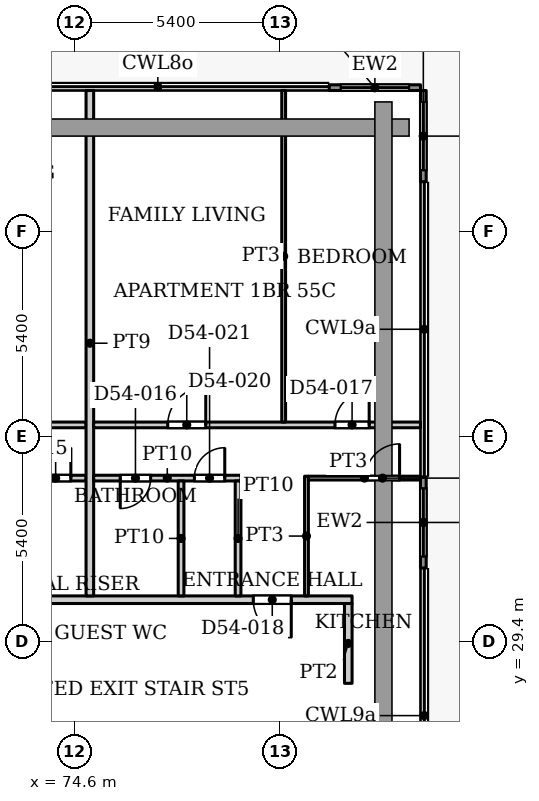
"""IFC4 building model, lengths in metres.
Left out: names, types, materials, properties, quantities, classifications, styles, units other than length and angle.
Written with IfcOpenShell. Run it as: python <this file> out.ifc"""

import sys

from ifc_helpers import new_model, si_unit, direction, frame, frame_2d, origin, place, context, subcontext, project, spatial, rectangle, extrude, source, transform, mapped, element, fill, save


model = new_model("IFC4")
c1 = context("Model", 3, precision=1e-05, world=origin(), true_north=direction((0.0, 1.0)))
c2 = subcontext(c1, "Body", "Model", "MODEL_VIEW")
j1 = project(units=[si_unit("LENGTHUNIT", "METRE"), si_unit("PLANEANGLEUNIT", "RADIAN")], contexts=[c1])
p1 = place(None, origin())
s1 = spatial("IfcSite", under=j1, at=p1, CompositionType="ELEMENT")
p2 = place(p1, origin())
s2 = spatial("IfcBuilding", under=s1, at=p2, CompositionType="ELEMENT")
p3 = place(p2, frame((0.0, 0.0, 235.7)))
s3 = spatial("IfcBuildingStorey", under=s2, at=p3, CompositionType="ELEMENT", Elevation=235.7)
p4 = place(p3, frame((81.3, 43.975, 0.0), z_axis=(0.0, 0.0, 1.0), x_axis=(1.0, 0.0, 0.0)))
e1 = element("IfcWall", 1, at=p4, inside=s3, PredefinedType="SOLIDWALL", context=c2, shape_type="SweptSolid", body=[
    extrude(rectangle(XDim=2.4, YDim=0.15, at=frame_2d((1.2, 0.0))), origin(), (0.0, 0.0, 1.0), 3.75),
])
p5 = place(p4, frame((0.3, 0.0, 0.0)))
e2 = element("IfcOpeningElement", 2, at=p5, cuts=e1, PredefinedType="OPENING", context=c2, shape_type="SweptSolid", body=[
    extrude(rectangle(XDim=1.8, YDim=2.4, at=frame_2d((0.9, 1.2))), frame((0.0, 0.085, 0.0), z_axis=(0.0, -1.0, 0.0), x_axis=(1.0, 0.0, 0.0)), (0.0, 0.0, 1.0), 0.17),
])
p6 = place(p3, frame((83.775, 43.9, 0.0), z_axis=(0.0, 0.0, 1.0), x_axis=(0.0, -1.0, 0.0)))
e3 = element("IfcWall", 3, at=p6, inside=s3, PredefinedType="SOLIDWALL", context=c2, shape_type="SweptSolid", body=[
    extrude(rectangle(XDim=2.4, YDim=0.15, at=frame_2d((1.2, 0.0))), origin(), (0.0, 0.0, 1.0), 3.75),
])
p7 = place(p6, frame((0.3, 0.0, 0.0)))
e4 = element("IfcOpeningElement", 4, at=p7, cuts=e3, PredefinedType="OPENING", context=c2, shape_type="SweptSolid", body=[
    extrude(rectangle(XDim=1.8, YDim=2.4, at=frame_2d((0.9, 1.2))), frame((0.0, 0.085, 0.0), z_axis=(0.0, -1.0, 0.0), x_axis=(1.0, 0.0, 0.0)), (0.0, 0.0, 1.0), 0.17),
])
p8 = place(p3, frame((83.775, 33.733, 0.0), z_axis=(0.0, 0.0, 1.0), x_axis=(0.0, -1.0, 0.0)))
e5 = element("IfcWall", 5, at=p8, inside=s3, PredefinedType="SOLIDWALL", context=c2, shape_type="SweptSolid", body=[
    extrude(rectangle(XDim=2.399, YDim=0.15, at=frame_2d((1.199, 0.0))), origin(), (0.0, 0.0, 1.0), 3.75),
])
p9 = place(p8, frame((0.3, 0.0, 0.0)))
e6 = element("IfcOpeningElement", 6, at=p9, cuts=e5, PredefinedType="OPENING", context=c2, shape_type="SweptSolid", body=[
    extrude(rectangle(XDim=1.8, YDim=2.4, at=frame_2d((0.9, 1.2))), frame((0.0, 0.085, 0.0), z_axis=(0.0, -1.0, 0.0), x_axis=(1.0, 0.0, 0.0)), (0.0, 0.0, 1.0), 0.17),
])
p10 = place(p3, frame((53.499, 30.5, 0.0), z_axis=(0.0, 0.0, 1.0), x_axis=(1.0, 0.0, 0.0)))
e7 = element("IfcWall", 7, at=p10, inside=s3, PredefinedType="PARTITIONING", context=c2, shape_type="SweptSolid", body=[
    extrude(rectangle(XDim=28.401, YDim=0.2, at=frame_2d((14.2, 0.0))), origin(), (0.0, 0.0, 1.0), 3.6),
])
p11 = place(p10, frame((0.301, 0.0, 0.0)))
e8 = element("IfcOpeningElement", 8, at=p11, cuts=e7, PredefinedType="OPENING", context=c2, shape_type="SweptSolid", body=[
    extrude(rectangle(XDim=1.0, YDim=2.1, at=frame_2d((0.5, 1.05))), frame((0.0, 0.11, 0.0), z_axis=(0.0, -1.0, 0.0), x_axis=(1.0, 0.0, 0.0)), (0.0, 0.0, 1.0), 0.22),
])
p12 = place(p10, frame((18.151, 0.0, 0.0)))
e9 = element("IfcOpeningElement", 9, at=p12, cuts=e7, PredefinedType="OPENING", context=c2, shape_type="SweptSolid", body=[
    extrude(rectangle(XDim=1.0, YDim=2.1, at=frame_2d((0.5, 1.05))), frame((0.0, 0.11, 0.0), z_axis=(0.0, -1.0, 0.0), x_axis=(1.0, 0.0, 0.0)), (0.0, 0.0, 1.0), 0.22),
])
p13 = place(p10, frame((25.801, 0.0, 0.0)))
e10 = element("IfcOpeningElement", 10, at=p13, cuts=e7, PredefinedType="OPENING", context=c2, shape_type="SweptSolid", body=[
    extrude(rectangle(XDim=1.0, YDim=2.1, at=frame_2d((0.5, 1.05))), frame((0.0, 0.11, 0.0), z_axis=(0.0, -1.0, 0.0), x_axis=(1.0, 0.0, 0.0)), (0.0, 0.0, 1.0), 0.22),
])
p14 = place(p3, frame((65.2, 35.1, 0.0), z_axis=(0.0, 0.0, 1.0), x_axis=(1.0, 0.0, 0.0)))
e11 = element("IfcWall", 11, at=p14, inside=s3, PredefinedType="PARTITIONING", context=c2, shape_type="SweptSolid", body=[
    extrude(rectangle(XDim=9.7, YDim=0.15, at=frame_2d((4.85, 0.0))), origin(), (0.0, 0.0, 1.0), 3.6),
])
p15 = place(p14, frame((1.4, 0.0, 0.0)))
e12 = element("IfcOpeningElement", 12, at=p15, cuts=e11, PredefinedType="OPENING", context=c2, shape_type="SweptSolid", body=[
    extrude(rectangle(XDim=0.9, YDim=2.1, at=frame_2d((0.45, 1.05))), frame((0.0, 0.085, 0.0), z_axis=(0.0, -1.0, 0.0), x_axis=(1.0, 0.0, 0.0)), (0.0, 0.0, 1.0), 0.17),
])
p16 = place(p14, frame((6.3, 0.0, 0.0)))
e13 = element("IfcOpeningElement", 13, at=p16, cuts=e11, PredefinedType="OPENING", context=c2, shape_type="SweptSolid", body=[
    extrude(rectangle(XDim=1.0, YDim=2.1, at=frame_2d((0.5, 1.05))), frame((0.0, 0.085, 0.0), z_axis=(0.0, -1.0, 0.0), x_axis=(1.0, 0.0, 0.0)), (0.0, 0.0, 1.0), 0.17),
])
p17 = place(p3, frame((73.275, 33.7, 0.0), z_axis=(0.0, 0.0, 1.0), x_axis=(1.0, 0.0, 0.0)))
e14 = element("IfcWall", 14, at=p17, inside=s3, PredefinedType="PARTITIONING", context=c2, shape_type="SweptSolid", body=[
    extrude(rectangle(XDim=1.625, YDim=0.15, at=frame_2d((0.812, 0.0))), origin(), (0.0, 0.0, 1.0), 3.6),
])
p18 = place(p17, frame((0.425, 0.0, 0.0)))
e15 = element("IfcOpeningElement", 15, at=p18, cuts=e14, PredefinedType="OPENING", context=c2, shape_type="SweptSolid", body=[
    extrude(rectangle(XDim=0.8, YDim=2.1, at=frame_2d((0.4, 1.05))), frame((0.0, 0.085, 0.0), z_axis=(0.0, -1.0, 0.0), x_axis=(1.0, 0.0, 0.0)), (0.0, 0.0, 1.0), 0.17),
])
p19 = place(p3, frame((75.0, 30.6, 0.0), z_axis=(0.0, 0.0, 1.0), x_axis=(0.0, 1.0, 0.0)))
e16 = element("IfcWall", 16, at=p19, inside=s3, PredefinedType="PARTITIONING", context=c2, shape_type="SweptSolid", body=[
    extrude(rectangle(XDim=13.3, YDim=0.2, at=frame_2d((6.65, 0.0))), origin(), (0.0, 0.0, 1.0), 3.6),
])
p20 = place(p3, frame((75.1, 33.7, 0.0), z_axis=(0.0, 0.0, 1.0), x_axis=(1.0, 0.0, 0.0)))
e17 = element("IfcWall", 17, at=p20, inside=s3, PredefinedType="PARTITIONING", context=c2, shape_type="SweptSolid", body=[
    extrude(rectangle(XDim=3.875, YDim=0.15, at=frame_2d((1.938, 0.0))), origin(), (0.0, 0.0, 1.0), 3.6),
])
p21 = place(p20, frame((0.7, 0.0, 0.0)))
e18 = element("IfcOpeningElement", 18, at=p21, cuts=e17, PredefinedType="OPENING", context=c2, shape_type="SweptSolid", body=[
    extrude(rectangle(XDim=0.8, YDim=2.1, at=frame_2d((0.4, 1.05))), frame((0.0, 0.085, 0.0), z_axis=(0.0, -1.0, 0.0), x_axis=(1.0, 0.0, 0.0)), (0.0, 0.0, 1.0), 0.17),
])
p22 = place(p20, frame((2.65, 0.0, 0.0)))
e19 = element("IfcOpeningElement", 19, at=p22, cuts=e17, PredefinedType="OPENING", context=c2, shape_type="SweptSolid", body=[
    extrude(rectangle(XDim=0.8, YDim=2.1, at=frame_2d((0.4, 1.05))), frame((0.0, 0.085, 0.0), z_axis=(0.0, -1.0, 0.0), x_axis=(1.0, 0.0, 0.0)), (0.0, 0.0, 1.0), 0.17),
])
p23 = place(p3, frame((75.1, 35.1, 0.0), z_axis=(0.0, 0.0, 1.0), x_axis=(1.0, 0.0, 0.0)))
e20 = element("IfcWall", 20, at=p23, inside=s3, PredefinedType="PARTITIONING", context=c2, shape_type="SweptSolid", body=[
    extrude(rectangle(XDim=8.6, YDim=0.15, at=frame_2d((4.3, 0.0))), origin(), (0.0, 0.0, 1.0), 3.6),
])
p24 = place(p23, frame((6.35, 0.0, 0.0)))
e21 = element("IfcOpeningElement", 21, at=p24, cuts=e20, PredefinedType="OPENING", context=c2, shape_type="SweptSolid", body=[
    extrude(rectangle(XDim=0.9, YDim=2.1, at=frame_2d((0.45, 1.05))), frame((0.0, 0.085, 0.0), z_axis=(0.0, -1.0, 0.0), x_axis=(1.0, 0.0, 0.0)), (0.0, 0.0, 1.0), 0.17),
])
p25 = place(p23, frame((1.95, 0.0, 0.0)))
e22 = element("IfcOpeningElement", 22, at=p25, cuts=e20, PredefinedType="OPENING", context=c2, shape_type="SweptSolid", body=[
    extrude(rectangle(XDim=1.0, YDim=2.1, at=frame_2d((0.5, 1.05))), frame((0.0, 0.085, 0.0), z_axis=(0.0, -1.0, 0.0), x_axis=(1.0, 0.0, 0.0)), (0.0, 0.0, 1.0), 0.17),
])
for number, where, z_axis, x_axis in (
    (23, (77.4, 30.6, 0.0), (0.0, 0.0, 1.0), (0.0, 1.0, 0.0)),
    (24, (78.9, 30.6, 0.0), (0.0, 0.0, 1.0), (0.0, 1.0, 0.0)),
):
    element("IfcWall", number, at=place(p3, frame(where, z_axis=z_axis, x_axis=x_axis)), inside=s3, PredefinedType="PARTITIONING", context=c2, shape_type="SweptSolid", body=[
        extrude(rectangle(XDim=3.025, YDim=0.15, at=frame_2d((1.512, 0.0))), origin(), (0.0, 0.0, 1.0), 3.6),
    ])
p26 = place(p3, frame((80.1, 35.175, 0.0), z_axis=(0.0, 0.0, 1.0), x_axis=(0.0, 1.0, 0.0)))
e25 = element("IfcWall", 25, at=p26, inside=s3, PredefinedType="PARTITIONING", context=c2, shape_type="SweptSolid", body=[
    extrude(rectangle(XDim=8.725, YDim=0.1, at=frame_2d((4.362, 0.0))), origin(), (0.0, 0.0, 1.0), 3.6),
])
p27 = place(p3, frame((80.7, 30.6, 0.0), z_axis=(0.0, 0.0, 1.0), x_axis=(0.0, 1.0, 0.0)))
e26 = element("IfcWall", 26, at=p27, inside=s3, PredefinedType="PARTITIONING", context=c2, shape_type="SweptSolid", body=[
    extrude(rectangle(XDim=3.15, YDim=0.1, at=frame_2d((1.575, 0.0))), origin(), (0.0, 0.0, 1.0), 3.6),
])
p28 = place(p3, frame((80.75, 33.7, 0.0), z_axis=(0.0, 0.0, 1.0), x_axis=(1.0, 0.0, 0.0)))
e27 = element("IfcWall", 27, at=p28, inside=s3, PredefinedType="PARTITIONING", context=c2, shape_type="SweptSolid", body=[
    extrude(rectangle(XDim=2.95, YDim=0.1, at=frame_2d((1.475, 0.0))), origin(), (0.0, 0.0, 1.0), 3.6),
])
p29 = place(p28, frame((1.5, 0.0, 0.0)))
e28 = element("IfcOpeningElement", 28, at=p29, cuts=e27, PredefinedType="OPENING", context=c2, shape_type="SweptSolid", body=[
    extrude(rectangle(XDim=0.9, YDim=2.1, at=frame_2d((0.45, 1.05))), frame((0.0, 0.06, 0.0), z_axis=(0.0, -1.0, 0.0), x_axis=(1.0, 0.0, 0.0)), (0.0, 0.0, 1.0), 0.12),
])
p30 = place(p3, frame((81.8, 28.3, 0.0), z_axis=(0.0, 0.0, 1.0), x_axis=(0.0, 1.0, 0.0)))
e29 = element("IfcWall", 29, at=p30, inside=s3, PredefinedType="PARTITIONING", context=c2, shape_type="SweptSolid", body=[
    extrude(rectangle(XDim=2.1, YDim=0.2, at=frame_2d((1.05, 0.0))), origin(), (0.0, 0.0, 1.0), 3.6),
])
m1 = source(origin(), c2, "Body", "SweptSolid", [
    extrude(rectangle(XDim=1.8, YDim=2.4, at=frame_2d((0.9, 1.2))), frame((0.0, 0.025, 0.0), z_axis=(0.0, -1.0, 0.0), x_axis=(1.0, 0.0, 0.0)), (0.0, 0.0, 1.0), 0.05),
])
p31 = place(p5, origin())
e30 = element("IfcDoor", 30, at=p31, inside=s3, OperationType="SLIDING_TO_LEFT", PredefinedType="DOOR", context=c2, shape_type="MappedRepresentation", body=[
    mapped(m1, transform((0.0, 0.0, 0.0), x_axis=(1.0, 0.0, 0.0), y_axis=(0.0, 1.0, 0.0), z_axis=(0.0, 0.0, 1.0), scale=1.0)),
])
fill(e2, e30)
p32 = place(p7, origin())
e31 = element("IfcDoor", 31, at=p32, inside=s3, OperationType="SLIDING_TO_LEFT", PredefinedType="DOOR", context=c2, shape_type="MappedRepresentation", body=[
    mapped(m1, transform((0.0, 0.0, 0.0), x_axis=(1.0, 0.0, 0.0), y_axis=(0.0, 1.0, 0.0), z_axis=(0.0, 0.0, 1.0), scale=1.0)),
])
fill(e4, e31)
p33 = place(p9, origin())
e32 = element("IfcDoor", 32, at=p33, inside=s3, OperationType="SLIDING_TO_LEFT", PredefinedType="DOOR", context=c2, shape_type="MappedRepresentation", body=[
    mapped(m1, transform((0.0, 0.0, 0.0), x_axis=(1.0, 0.0, 0.0), y_axis=(0.0, 1.0, 0.0), z_axis=(0.0, 0.0, 1.0), scale=1.0)),
])
fill(e6, e32)
m2 = source(origin(), c2, "Body", "SweptSolid", [
    extrude(rectangle(XDim=0.8, YDim=2.1, at=frame_2d((0.4, 1.05))), frame((0.0, 0.025, 0.0), z_axis=(0.0, -1.0, 0.0), x_axis=(1.0, 0.0, 0.0)), (0.0, 0.0, 1.0), 0.05),
])
p34 = place(p18, origin())
e33 = element("IfcDoor", 33, at=p34, inside=s3, OperationType="SINGLE_SWING_LEFT", PredefinedType="DOOR", context=c2, shape_type="MappedRepresentation", body=[
    mapped(m2, transform((0.0, 0.0, 0.0), x_axis=(1.0, 0.0, 0.0), y_axis=(0.0, 1.0, 0.0), z_axis=(0.0, 0.0, 1.0), scale=1.0)),
])
fill(e15, e33)
p35 = place(p21, origin())
e34 = element("IfcDoor", 34, at=p35, inside=s3, OperationType="SINGLE_SWING_RIGHT", PredefinedType="DOOR", context=c2, shape_type="MappedRepresentation", body=[
    mapped(m2, transform((0.0, 0.0, 0.0), x_axis=(1.0, 0.0, 0.0), y_axis=(0.0, 1.0, 0.0), z_axis=(0.0, 0.0, 1.0), scale=1.0)),
])
fill(e18, e34)
m3 = source(origin(), c2, "Body", "SweptSolid", [
    extrude(rectangle(XDim=0.9, YDim=2.1, at=frame_2d((0.45, 1.05))), frame((0.0, 0.025, 0.0), z_axis=(0.0, -1.0, 0.0), x_axis=(1.0, 0.0, 0.0)), (0.0, 0.0, 1.0), 0.05),
])
p36 = place(p24, origin())
e35 = element("IfcDoor", 35, at=p36, inside=s3, OperationType="SINGLE_SWING_LEFT", PredefinedType="DOOR", context=c2, shape_type="MappedRepresentation", body=[
    mapped(m3, transform((0.0, 0.0, 0.0), x_axis=(1.0, 0.0, 0.0), y_axis=(0.0, 1.0, 0.0), z_axis=(0.0, 0.0, 1.0), scale=1.0)),
])
fill(e21, e35)
m4 = source(origin(), c2, "Body", "SweptSolid", [
    extrude(rectangle(XDim=1.0, YDim=2.1, at=frame_2d((0.5, 1.05))), frame((0.0, 0.025, 0.0), z_axis=(0.0, -1.0, 0.0), x_axis=(1.0, 0.0, 0.0)), (0.0, 0.0, 1.0), 0.05),
])
p37 = place(p13, origin())
e36 = element("IfcDoor", 36, at=p37, inside=s3, OperationType="SINGLE_SWING_RIGHT", PredefinedType="DOOR", context=c2, shape_type="MappedRepresentation", body=[
    mapped(m4, transform((0.0, 0.0, 0.0), x_axis=(1.0, 0.0, 0.0), y_axis=(0.0, 1.0, 0.0), z_axis=(0.0, 0.0, 1.0), scale=1.0)),
])
fill(e10, e36)
p38 = place(p29, origin())
e37 = element("IfcDoor", 37, at=p38, inside=s3, OperationType="SINGLE_SWING_LEFT", PredefinedType="DOOR", context=c2, shape_type="MappedRepresentation", body=[
    mapped(m3, transform((0.0, 0.0, 0.0), x_axis=(1.0, 0.0, 0.0), y_axis=(0.0, 1.0, 0.0), z_axis=(0.0, 0.0, 1.0), scale=1.0)),
])
fill(e28, e37)
m5 = source(origin(), c2, "Body", "SweptSolid", [
    extrude(rectangle(XDim=1.0, YDim=2.1, at=frame_2d((0.5, 1.05))), frame((0.0, 0.025, 0.0), z_axis=(0.0, -1.0, 0.0), x_axis=(1.0, 0.0, 0.0)), (0.0, 0.0, 1.0), 0.05),
])
p39 = place(p25, origin())
e38 = element("IfcDoor", 38, at=p39, inside=s3, OperationType="SINGLE_SWING_LEFT", PredefinedType="DOOR", context=c2, shape_type="MappedRepresentation", body=[
    mapped(m5, transform((0.0, 0.0, 0.0), x_axis=(1.0, 0.0, 0.0), y_axis=(0.0, 1.0, 0.0), z_axis=(0.0, 0.0, 1.0), scale=1.0)),
])
fill(e22, e38)
p40 = place(p22, origin())
e39 = element("IfcDoor", 39, at=p40, inside=s3, OperationType="SINGLE_SWING_LEFT", PredefinedType="DOOR", context=c2, shape_type="MappedRepresentation", body=[
    mapped(m2, transform((0.0, 0.0, 0.0), x_axis=(1.0, 0.0, 0.0), y_axis=(0.0, 1.0, 0.0), z_axis=(0.0, 0.0, 1.0), scale=1.0)),
])
fill(e19, e39)
save(model, sys.argv[1])
